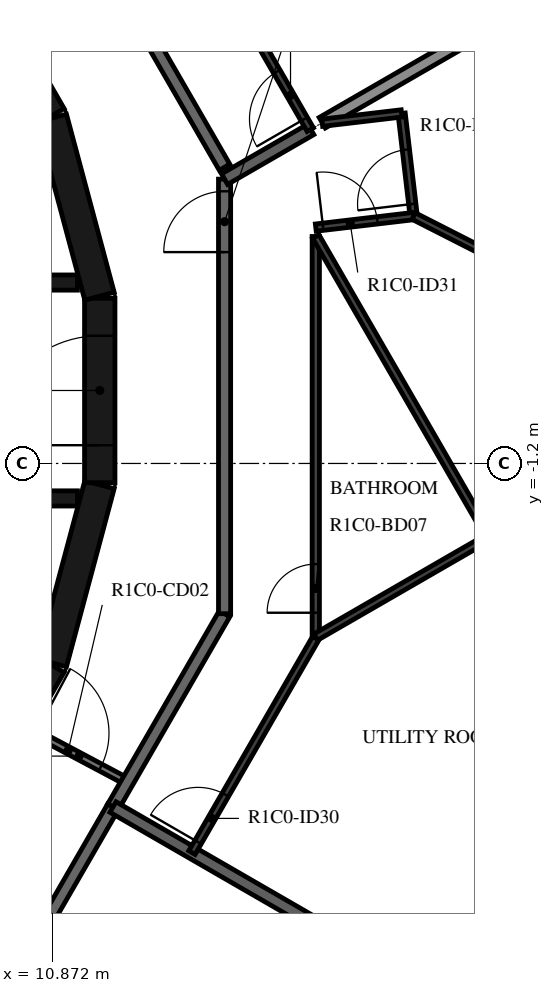
"""IFC4 building model, lengths in metres.
Left out: names, types, materials, properties, quantities, classifications, styles, units other than length and angle.
Written with IfcOpenShell. Run it as: python <this file> out.ifc"""

import sys

from ifc_helpers import new_model, si_unit, direction, frame, frame_2d, origin, place, context, subcontext, project, spatial, rectangle, extrude, element, fill, save


model = new_model("IFC4")
c1 = context("Model", 3, precision=1e-05, world=origin(), true_north=direction((0.0, 1.0)))
c2 = subcontext(c1, "Body", "Model", "MODEL_VIEW")
j1 = project(units=[si_unit("LENGTHUNIT", "METRE"), si_unit("PLANEANGLEUNIT", "RADIAN")], contexts=[c1])
p1 = place(None, origin())
s1 = spatial("IfcSite", under=j1, at=p1, CompositionType="ELEMENT")
p2 = place(p1, origin())
s2 = spatial("IfcBuilding", under=s1, at=p2, CompositionType="ELEMENT")
p3 = place(p2, frame((0.0, 0.0, 59.4)))
s3 = spatial("IfcBuildingStorey", under=s2, at=p3, CompositionType="ELEMENT", Elevation=59.4)
for number, where, z_axis, x_axis in (
    (1, (9.329, -7.137, 0.0), (0.0, 0.0, 1.0), (0.5, 0.866, 0.0)),
    (2, (10.858, -4.479, 0.0), (0.0, 0.0, 1.0), (0.259, 0.966, 0.0)),
):
    element("IfcWall", number, at=place(p3, frame(where, z_axis=z_axis, x_axis=x_axis)), inside=s3, PredefinedType="SHEAR", context=c2, shape_type="SweptSolid", body=[
        extrude(rectangle(XDim=3.033, YDim=0.5, at=frame_2d((1.516, 0.0))), origin(), (0.0, 0.0, 1.0), 3.12),
    ])
p4 = place(p3, frame((11.647, -1.516, 0.0), z_axis=(0.0, 0.0, 1.0), x_axis=(0.0, 1.0, 0.0)))
e3 = element("IfcWall", 3, at=p4, inside=s3, PredefinedType="SHEAR", context=c2, shape_type="SweptSolid", body=[
    extrude(rectangle(XDim=3.033, YDim=0.5, at=frame_2d((1.516, 0.0))), origin(), (0.0, 0.0, 1.0), 3.12),
])
p5 = place(p4, frame((0.616, 0.0, 0.0)))
e4 = element("IfcOpeningElement", 4, at=p5, cuts=e3, PredefinedType="OPENING", context=c2, shape_type="SweptSolid", body=[
    extrude(rectangle(XDim=1.8, YDim=2.1, at=frame_2d((0.9, 1.05))), frame((0.0, 0.26, 0.0), z_axis=(0.0, -1.0, 0.0), x_axis=(1.0, 0.0, 0.0)), (0.0, 0.0, 1.0), 0.52),
])
for number, where, z_axis, x_axis in (
    (5, (11.643, 1.55, 0.0), (0.0, 0.0, 1.0), (-0.259, 0.966, 0.0)),
    (6, (10.845, 4.51, 0.0), (0.0, 0.0, 1.0), (-0.5, 0.866, 0.0)),
):
    element("IfcWall", number, at=place(p3, frame(where, z_axis=z_axis, x_axis=x_axis)), inside=s3, PredefinedType="SHEAR", context=c2, shape_type="SweptSolid", body=[
        extrude(rectangle(XDim=3.033, YDim=0.5, at=frame_2d((1.516, 0.0))), origin(), (0.0, 0.0, 1.0), 3.12),
    ])
p6 = place(p3, frame((3.35, 1.775, 0.0), z_axis=(0.0, 0.0, 1.0), x_axis=(1.0, 0.0, 0.0)))
e7 = element("IfcWall", 7, at=p6, inside=s3, PredefinedType="SHEAR", context=c2, shape_type="SweptSolid", body=[
    extrude(rectangle(XDim=7.93, YDim=0.25, at=frame_2d((3.965, 0.0))), origin(), (0.0, 0.0, 1.0), 3.12),
])
p7 = place(p6, frame((0.35, 0.0, 0.0)))
e8 = element("IfcOpeningElement", 8, at=p7, cuts=e7, PredefinedType="OPENING", context=c2, shape_type="SweptSolid", body=[
    extrude(rectangle(XDim=1.2, YDim=2.4, at=frame_2d((0.6, 1.2))), frame((0.0, 0.135, 0.0), z_axis=(0.0, -1.0, 0.0), x_axis=(1.0, 0.0, 0.0)), (0.0, 0.0, 1.0), 0.27),
])
p8 = place(p6, frame((2.5, 0.0, 0.0)))
e9 = element("IfcOpeningElement", 9, at=p8, cuts=e7, PredefinedType="OPENING", context=c2, shape_type="SweptSolid", body=[
    extrude(rectangle(XDim=1.2, YDim=2.4, at=frame_2d((0.6, 1.2))), frame((0.0, 0.135, 0.0), z_axis=(0.0, -1.0, 0.0), x_axis=(1.0, 0.0, 0.0)), (0.0, 0.0, 1.0), 0.27),
])
p9 = place(p6, frame((4.8, 0.0, 0.0)))
e10 = element("IfcOpeningElement", 10, at=p9, cuts=e7, PredefinedType="OPENING", context=c2, shape_type="SweptSolid", body=[
    extrude(rectangle(XDim=0.9, YDim=2.1, at=frame_2d((0.45, 1.05))), frame((0.0, 0.135, 0.0), z_axis=(0.0, -1.0, 0.0), x_axis=(1.0, 0.0, 0.0)), (0.0, 0.0, 1.0), 0.27),
])
p10 = place(p3, frame((3.35, -1.775, 0.0), z_axis=(0.0, 0.0, 1.0), x_axis=(1.0, 0.0, 0.0)))
e11 = element("IfcWall", 11, at=p10, inside=s3, PredefinedType="SHEAR", context=c2, shape_type="SweptSolid", body=[
    extrude(rectangle(XDim=7.93, YDim=0.25, at=frame_2d((3.965, 0.0))), origin(), (0.0, 0.0, 1.0), 3.12),
])
p11 = place(p10, frame((0.4, 0.0, 0.0)))
e12 = element("IfcOpeningElement", 12, at=p11, cuts=e11, PredefinedType="OPENING", context=c2, shape_type="SweptSolid", body=[
    extrude(rectangle(XDim=1.1, YDim=2.4, at=frame_2d((0.55, 1.2))), frame((0.0, 0.135, 0.0), z_axis=(0.0, -1.0, 0.0), x_axis=(1.0, 0.0, 0.0)), (0.0, 0.0, 1.0), 0.27),
])
p12 = place(p10, frame((2.55, 0.0, 0.0)))
e13 = element("IfcOpeningElement", 13, at=p12, cuts=e11, PredefinedType="OPENING", context=c2, shape_type="SweptSolid", body=[
    extrude(rectangle(XDim=1.1, YDim=2.4, at=frame_2d((0.55, 1.2))), frame((0.0, 0.135, 0.0), z_axis=(0.0, -1.0, 0.0), x_axis=(1.0, 0.0, 0.0)), (0.0, 0.0, 1.0), 0.27),
])
p13 = place(p10, frame((4.7, 0.0, 0.0)))
e14 = element("IfcOpeningElement", 14, at=p13, cuts=e11, PredefinedType="OPENING", context=c2, shape_type="SweptSolid", body=[
    extrude(rectangle(XDim=1.1, YDim=2.4, at=frame_2d((0.55, 1.2))), frame((0.0, 0.135, 0.0), z_axis=(0.0, -1.0, 0.0), x_axis=(1.0, 0.0, 0.0)), (0.0, 0.0, 1.0), 0.27),
])
p14 = place(p3, frame((10.511, -5.589, 0.0), z_axis=(0.0, 0.0, 1.0), x_axis=(0.88294043061, -0.469485032769, 0.0)))
e15 = element("IfcWall", 15, at=p14, inside=s3, PredefinedType="PARTITIONING", context=c2, shape_type="SweptSolid", body=[
    extrude(rectangle(XDim=1.804, YDim=0.12, at=frame_2d((0.902, 0.0))), origin(), (0.0, 0.0, 1.0), 3.12),
])
p15 = place(p14, frame((0.1, 0.0, 0.0)))
e16 = element("IfcOpeningElement", 16, at=p15, cuts=e15, PredefinedType="OPENING", context=c2, shape_type="SweptSolid", body=[
    extrude(rectangle(XDim=1.2, YDim=2.1, at=frame_2d((0.6, 1.05))), frame((0.0, 0.07, 0.0), z_axis=(0.0, -1.0, 0.0), x_axis=(1.0, 0.0, 0.0)), (0.0, 0.0, 1.0), 0.14),
])
p16 = place(p3, frame((13.7, 3.671, 0.0), z_axis=(0.0, 0.0, 1.0), x_axis=(-0.500001669485, 0.866024439905, 0.0)))
e17 = element("IfcWall", 17, at=p16, inside=s3, PredefinedType="STANDARD", context=c2, shape_type="SweptSolid", body=[
    extrude(rectangle(XDim=7.342, YDim=0.2, at=frame_2d((3.671, 0.0))), origin(), (0.0, 0.0, 1.0), 3.12),
])
p17 = place(p16, frame((6.142, 0.0, 0.0)))
e18 = element("IfcOpeningElement", 18, at=p17, cuts=e17, PredefinedType="OPENING", context=c2, shape_type="SweptSolid", body=[
    extrude(rectangle(XDim=1.0, YDim=2.1, at=frame_2d((0.5, 1.05))), frame((0.0, 0.11, 0.0), z_axis=(0.0, -1.0, 0.0), x_axis=(1.0, 0.0, 0.0)), (0.0, 0.0, 1.0), 0.22),
])
p18 = place(p3, frame((11.865, -6.85, 0.0), z_axis=(0.0, 0.0, 1.0), x_axis=(0.499987270552, 0.86603275301, 0.0)))
e19 = element("IfcWall", 19, at=p18, inside=s3, PredefinedType="STANDARD", context=c2, shape_type="SweptSolid", body=[
    extrude(rectangle(XDim=3.671, YDim=0.2, at=frame_2d((1.835, 0.0))), origin(), (0.0, 0.0, 1.0), 3.12),
])
p19 = place(p3, frame((13.7, -3.671, 0.0), z_axis=(0.0, 0.0, 1.0), x_axis=(0.0, 1.0, 0.0)))
e20 = element("IfcWall", 20, at=p19, inside=s3, PredefinedType="STANDARD", context=c2, shape_type="SweptSolid", body=[
    extrude(rectangle(XDim=7.146, YDim=0.2, at=frame_2d((3.573, 0.0))), origin(), (0.0, 0.0, 1.0), 3.12),
])
p20 = place(p19, frame((5.947, 0.0, 0.0)))
e21 = element("IfcOpeningElement", 21, at=p20, cuts=e20, PredefinedType="OPENING", context=c2, shape_type="SweptSolid", body=[
    extrude(rectangle(XDim=1.0, YDim=2.1, at=frame_2d((0.5, 1.05))), frame((0.0, 0.11, 0.0), z_axis=(0.0, -1.0, 0.0), x_axis=(1.0, 0.0, 0.0)), (0.0, 0.0, 1.0), 0.22),
])
p21 = place(p3, frame((10.029, -10.029, 0.0), z_axis=(0.0, 0.0, 1.0), x_axis=(0.50001606911, 0.866016126081, 0.0)))
e22 = element("IfcWall", 22, at=p21, inside=s3, PredefinedType="STANDARD", context=c2, shape_type="SweptSolid", body=[
    extrude(rectangle(XDim=3.671, YDim=0.2, at=frame_2d((1.835, 0.0))), origin(), (0.0, 0.0, 1.0), 3.12),
])
p22 = place(p3, frame((13.7, 3.476, 0.0), z_axis=(0.0, 0.0, 1.0), x_axis=(0.866014281772, 0.500019263395, 0.0)))
e23 = element("IfcWall", 23, at=p22, inside=s3, PredefinedType="STANDARD", context=c2, shape_type="SweptSolid", body=[
    extrude(rectangle(XDim=1.638, YDim=0.2, at=frame_2d((0.819, 0.0))), origin(), (0.0, 0.0, 1.0), 3.12),
])
p23 = place(p3, frame((15.306, 4.403, 0.0), z_axis=(0.0, 0.0, 1.0), x_axis=(0.866013143551, 0.500021234745, 0.0)))
e24 = element("IfcWall", 24, at=p23, inside=s3, PredefinedType="STANDARD", context=c2, shape_type="SweptSolid", body=[
    extrude(rectangle(XDim=4.173, YDim=0.2, at=frame_2d((2.086, 0.0))), origin(), (0.0, 0.0, 1.0), 2.73),
])
p24 = place(p3, frame((16.817, -9.709, 0.0), z_axis=(0.0, 0.0, 1.0), x_axis=(-0.86604338933, 0.499968846828, 0.0)))
e25 = element("IfcWall", 25, at=p24, inside=s3, PredefinedType="STANDARD", context=c2, shape_type="SweptSolid", body=[
    extrude(rectangle(XDim=5.718, YDim=0.2, at=frame_2d((2.859, 0.0))), origin(), (0.0, 0.0, 1.0), 3.12),
])
p25 = place(p3, frame((15.11, 4.289, 0.0), z_axis=(0.0, 0.0, 1.0), x_axis=(-0.500033654285, 0.866005972602, 0.0)))
e26 = element("IfcWall", 26, at=p25, inside=s3, PredefinedType="PARTITIONING", context=c2, shape_type="SweptSolid", body=[
    extrude(rectangle(XDim=5.003, YDim=0.12, at=frame_2d((2.501, 0.0))), origin(), (0.0, 0.0, 1.0), 3.12),
])
p26 = place(p25, frame((0.2, 0.0, 0.0)))
e27 = element("IfcOpeningElement", 27, at=p26, cuts=e26, PredefinedType="OPENING", context=c2, shape_type="SweptSolid", body=[
    extrude(rectangle(XDim=0.9, YDim=2.1, at=frame_2d((0.45, 1.05))), frame((0.0, 0.07, 0.0), z_axis=(0.0, -1.0, 0.0), x_axis=(1.0, 0.0, 0.0)), (0.0, 0.0, 1.0), 0.14),
])
p27 = place(p3, frame((16.81, 2.868, 0.0), z_axis=(0.0, 0.0, 1.0), x_axis=(-0.117049566217, 0.993126074096, 0.0)))
e28 = element("IfcWall", 28, at=p27, inside=s3, PredefinedType="PARTITIONING", context=c2, shape_type="SweptSolid", body=[
    extrude(rectangle(XDim=1.7, YDim=0.12, at=frame_2d((0.85, 0.0))), origin(), (0.0, 0.0, 1.0), 3.12),
])
p28 = place(p27, frame((0.2, 0.0, 0.0)))
e29 = element("IfcOpeningElement", 29, at=p28, cuts=e28, PredefinedType="OPENING", context=c2, shape_type="SweptSolid", body=[
    extrude(rectangle(XDim=0.9, YDim=2.1, at=frame_2d((0.45, 1.05))), frame((0.0, 0.07, 0.0), z_axis=(0.0, -1.0, 0.0), x_axis=(1.0, 0.0, 0.0)), (0.0, 0.0, 1.0), 0.14),
])
p29 = place(p3, frame((16.611, 4.556, 0.0), z_axis=(0.0, 0.0, 1.0), x_axis=(-0.993151872114, -0.116830470836, 0.0)))
e30 = element("IfcWall", 30, at=p29, inside=s3, PredefinedType="PARTITIONING", context=c2, shape_type="SweptSolid", body=[
    extrude(rectangle(XDim=1.314, YDim=0.12, at=frame_2d((0.657, 0.0))), origin(), (0.0, 0.0, 1.0), 3.12),
])
p30 = place(p3, frame((13.164, -7.6, 0.0), z_axis=(0.0, 0.0, 1.0), x_axis=(0.499974973053, 0.866039852617, 0.0)))
e31 = element("IfcWall", 31, at=p30, inside=s3, PredefinedType="PARTITIONING", context=c2, shape_type="SweptSolid", body=[
    extrude(rectangle(XDim=4.073, YDim=0.12, at=frame_2d((2.037, 0.0))), origin(), (0.0, 0.0, 1.0), 3.12),
])
p31 = place(p30, frame((0.2, 0.0, 0.0)))
e32 = element("IfcOpeningElement", 32, at=p31, cuts=e31, PredefinedType="OPENING", context=c2, shape_type="SweptSolid", body=[
    extrude(rectangle(XDim=0.9, YDim=2.1, at=frame_2d((0.45, 1.05))), frame((0.0, 0.07, 0.0), z_axis=(0.0, -1.0, 0.0), x_axis=(1.0, 0.0, 0.0)), (0.0, 0.0, 1.0), 0.14),
])
p32 = place(p3, frame((15.2, 2.679, 0.0), z_axis=(0.0, 0.0, 1.0), x_axis=(0.993150604323, 0.116841247567, 0.0)))
e33 = element("IfcWall", 33, at=p32, inside=s3, PredefinedType="PARTITIONING", context=c2, shape_type="SweptSolid", body=[
    extrude(rectangle(XDim=1.621, YDim=0.12, at=frame_2d((0.811, 0.0))), origin(), (0.0, 0.0, 1.0), 3.12),
])
p33 = place(p32, frame((0.12, 0.0, 0.0)))
e34 = element("IfcOpeningElement", 34, at=p33, cuts=e33, PredefinedType="OPENING", context=c2, shape_type="SweptSolid", body=[
    extrude(rectangle(XDim=0.9, YDim=2.1, at=frame_2d((0.45, 1.05))), frame((0.0, 0.07, 0.0), z_axis=(0.0, -1.0, 0.0), x_axis=(1.0, 0.0, 0.0)), (0.0, 0.0, 1.0), 0.14),
])
p34 = place(p3, frame((15.2, -4.055, 0.0), z_axis=(0.0, 0.0, 1.0), x_axis=(0.0, 1.0, 0.0)))
e35 = element("IfcWall", 35, at=p34, inside=s3, PredefinedType="PARTITIONING", context=c2, shape_type="SweptSolid", body=[
    extrude(rectangle(XDim=6.588, YDim=0.12, at=frame_2d((3.294, 0.0))), origin(), (0.0, 0.0, 1.0), 3.12),
])
p35 = place(p34, frame((0.4, 0.0, 0.0)))
e36 = element("IfcOpeningElement", 36, at=p35, cuts=e35, PredefinedType="OPENING", context=c2, shape_type="SweptSolid", body=[
    extrude(rectangle(XDim=0.8, YDim=2.1, at=frame_2d((0.4, 1.05))), frame((0.0, 0.07, 0.0), z_axis=(0.0, -1.0, 0.0), x_axis=(1.0, 0.0, 0.0)), (0.0, 0.0, 1.0), 0.14),
])
p36 = place(p3, frame((16.81, 2.868, 0.0), z_axis=(0.0, 0.0, 1.0), x_axis=(0.891097252128, -0.453812392128, 0.0)))
e37 = element("IfcWall", 37, at=p36, inside=s3, PredefinedType="PARTITIONING", context=c2, shape_type="SweptSolid", body=[
    extrude(rectangle(XDim=6.677, YDim=0.12, at=frame_2d((3.338, 0.0))), origin(), (0.0, 0.0, 1.0), 3.12),
])
p37 = place(p3, frame((15.2, 2.533, 0.0), z_axis=(0.0, 0.0, 1.0), x_axis=(0.500001127339, -0.866024752914, 0.0)))
e38 = element("IfcWall", 38, at=p37, inside=s3, PredefinedType="PARTITIONING", context=c2, shape_type="SweptSolid", body=[
    extrude(rectangle(XDim=14.434, YDim=0.12, at=frame_2d((7.217, 0.0))), origin(), (0.0, 0.0, 1.0), 3.12),
])
p38 = place(p37, frame((11.97, 0.0, 0.0)))
e39 = element("IfcOpeningElement", 39, at=p38, cuts=e38, PredefinedType="OPENING", context=c2, shape_type="SweptSolid", body=[
    extrude(rectangle(XDim=0.9, YDim=2.1, at=frame_2d((0.45, 1.05))), frame((0.0, 0.07, 0.0), z_axis=(0.0, -1.0, 0.0), x_axis=(1.0, 0.0, 0.0)), (0.0, 0.0, 1.0), 0.14),
])
p39 = place(p3, frame((20.905, -7.349, 0.0), z_axis=(0.0, 0.0, 1.0), x_axis=(-0.866032292145, -0.49998806882, 0.0)))
e40 = element("IfcWall", 40, at=p39, inside=s3, PredefinedType="PARTITIONING", context=c2, shape_type="SweptSolid", body=[
    extrude(rectangle(XDim=4.721, YDim=0.12, at=frame_2d((2.36, 0.0))), origin(), (0.0, 0.0, 1.0), 3.12),
])
p40 = place(p39, frame((0.2, 0.0, 0.0)))
e41 = element("IfcOpeningElement", 41, at=p40, cuts=e40, PredefinedType="OPENING", context=c2, shape_type="SweptSolid", body=[
    extrude(rectangle(XDim=0.9, YDim=2.1, at=frame_2d((0.45, 1.05))), frame((0.0, 0.07, 0.0), z_axis=(0.0, -1.0, 0.0), x_axis=(1.0, 0.0, 0.0)), (0.0, 0.0, 1.0), 0.14),
])
p41 = place(p3, frame((18.052, -2.408, 0.0), z_axis=(0.0, 0.0, 1.0), x_axis=(-0.866017718408, -0.500013311227, 0.0)))
e42 = element("IfcWall", 42, at=p41, inside=s3, PredefinedType="PARTITIONING", context=c2, shape_type="SweptSolid", body=[
    extrude(rectangle(XDim=3.294, YDim=0.12, at=frame_2d((1.647, 0.0))), origin(), (0.0, 0.0, 1.0), 3.12),
])
p42 = place(p5, origin())
e43 = element("IfcDoor", 43, at=p42, inside=s3, OperationType="DOUBLE_DOOR_SINGLE_SWING", PredefinedType="DOOR", context=c2, shape_type="SweptSolid", body=[
    extrude(rectangle(XDim=1.8, YDim=2.1, at=frame_2d((0.9, 1.05))), frame((0.0, 0.025, 0.0), z_axis=(0.0, -1.0, 0.0), x_axis=(1.0, 0.0, 0.0)), (0.0, 0.0, 1.0), 0.05),
])
fill(e4, e43)
p43 = place(p26, origin())
e44 = element("IfcDoor", 44, at=p43, inside=s3, OperationType="SINGLE_SWING_LEFT", PredefinedType="DOOR", context=c2, shape_type="SweptSolid", body=[
    extrude(rectangle(XDim=0.9, YDim=2.1, at=frame_2d((0.45, 1.05))), frame((0.0, 0.025, 0.0), z_axis=(0.0, -1.0, 0.0), x_axis=(1.0, 0.0, 0.0)), (0.0, 0.0, 1.0), 0.05),
])
fill(e27, e44)
p44 = place(p20, origin())
e45 = element("IfcDoor", 45, at=p44, inside=s3, OperationType="SINGLE_SWING_LEFT", PredefinedType="DOOR", context=c2, shape_type="SweptSolid", body=[
    extrude(rectangle(XDim=1.0, YDim=2.1, at=frame_2d((0.5, 1.05))), frame((0.0, 0.025, 0.0), z_axis=(0.0, -1.0, 0.0), x_axis=(1.0, 0.0, 0.0)), (0.0, 0.0, 1.0), 0.05),
])
fill(e21, e45)
p45 = place(p28, origin())
e46 = element("IfcDoor", 46, at=p45, inside=s3, OperationType="SINGLE_SWING_LEFT", PredefinedType="DOOR", context=c2, shape_type="SweptSolid", body=[
    extrude(rectangle(XDim=0.9, YDim=2.1, at=frame_2d((0.45, 1.05))), frame((0.0, 0.025, 0.0), z_axis=(0.0, -1.0, 0.0), x_axis=(1.0, 0.0, 0.0)), (0.0, 0.0, 1.0), 0.05),
])
fill(e29, e46)
p46 = place(p31, origin())
e47 = element("IfcDoor", 47, at=p46, inside=s3, OperationType="SINGLE_SWING_LEFT", PredefinedType="DOOR", context=c2, shape_type="SweptSolid", body=[
    extrude(rectangle(XDim=0.9, YDim=2.1, at=frame_2d((0.45, 1.05))), frame((0.0, 0.025, 0.0), z_axis=(0.0, -1.0, 0.0), x_axis=(1.0, 0.0, 0.0)), (0.0, 0.0, 1.0), 0.05),
])
fill(e32, e47)
p47 = place(p33, origin())
e48 = element("IfcDoor", 48, at=p47, inside=s3, OperationType="SINGLE_SWING_RIGHT", PredefinedType="DOOR", context=c2, shape_type="SweptSolid", body=[
    extrude(rectangle(XDim=0.9, YDim=2.1, at=frame_2d((0.45, 1.05))), frame((0.0, 0.025, 0.0), z_axis=(0.0, -1.0, 0.0), x_axis=(1.0, 0.0, 0.0)), (0.0, 0.0, 1.0), 0.05),
])
fill(e34, e48)
p48 = place(p35, origin())
e49 = element("IfcDoor", 49, at=p48, inside=s3, OperationType="SINGLE_SWING_LEFT", PredefinedType="DOOR", context=c2, shape_type="SweptSolid", body=[
    extrude(rectangle(XDim=0.8, YDim=2.1, at=frame_2d((0.4, 1.05))), frame((0.0, 0.025, 0.0), z_axis=(0.0, -1.0, 0.0), x_axis=(1.0, 0.0, 0.0)), (0.0, 0.0, 1.0), 0.05),
])
fill(e36, e49)
p49 = place(p15, origin())
e50 = element("IfcDoor", 50, at=p49, inside=s3, OperationType="DOUBLE_DOOR_SINGLE_SWING", PredefinedType="DOOR", context=c2, shape_type="SweptSolid", body=[
    extrude(rectangle(XDim=1.2, YDim=2.1, at=frame_2d((0.6, 1.05))), frame((0.0, 0.025, 0.0), z_axis=(0.0, -1.0, 0.0), x_axis=(1.0, 0.0, 0.0)), (0.0, 0.0, 1.0), 0.05),
])
fill(e16, e50)
save(model, sys.argv[1])
